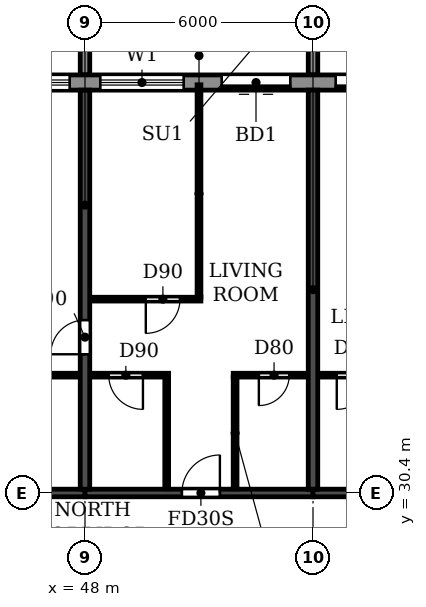
"""IFC4 building model, lengths in metres.
Left out: names, types, materials, properties, quantities, classifications, styles, units other than length and angle.
Written with IfcOpenShell. Run it as: python <this file> out.ifc"""

import sys

from ifc_helpers import new_model, si_unit, direction, frame, frame_2d, origin, place, context, subcontext, project, spatial, polyline, rectangle, outline, extrude, source, transform, mapped, element, fill, save


model = new_model("IFC4")
c1 = context("Model", 3, precision=1e-05, world=origin(), true_north=direction((0.0, 1.0)))
c2 = subcontext(c1, "Body", "Model", "MODEL_VIEW")
j1 = project(units=[si_unit("LENGTHUNIT", "METRE"), si_unit("PLANEANGLEUNIT", "RADIAN")], contexts=[c1])
p1 = place(None, origin())
s1 = spatial("IfcSite", under=j1, at=p1, CompositionType="ELEMENT")
p2 = place(p1, origin())
s2 = spatial("IfcBuilding", under=s1, at=p2, CompositionType="ELEMENT")
p3 = place(p2, frame((0.0, 0.0, 257.7)))
s3 = spatial("IfcBuildingStorey", under=s2, at=p3, CompositionType="ELEMENT", Elevation=257.7)
p4 = place(p3, frame((48.0, 30.5, 0.0), z_axis=(0.0, 0.0, 1.0), x_axis=(0.0, 1.0, 0.0)))
e1 = element("IfcWall", 1, at=p4, inside=s3, PredefinedType="SHEAR", context=c2, shape_type="SweptSolid", body=[
    extrude(rectangle(XDim=10.5, YDim=0.25, at=frame_2d((5.25, 0.0))), origin(), (0.0, 0.0, 1.0), 3.0),
])
p5 = place(p4, frame((3.55, 0.0, 0.0)))
e2 = element("IfcOpeningElement", 2, at=p5, cuts=e1, PredefinedType="OPENING", context=c2, shape_type="SweptSolid", body=[
    extrude(rectangle(XDim=0.9, YDim=2.1, at=frame_2d((0.45, 1.05))), frame((0.0, 0.135, 0.0), z_axis=(0.0, -1.0, 0.0), x_axis=(1.0, 0.0, 0.0)), (0.0, 0.0, 1.0), 0.27),
])
p6 = place(p3, frame((54.0, 30.5, 0.0), z_axis=(0.0, 0.0, 1.0), x_axis=(0.0, 1.0, 0.0)))
e3 = element("IfcWall", 3, at=p6, inside=s3, PredefinedType="SHEAR", context=c2, shape_type="SweptSolid", body=[
    extrude(rectangle(XDim=10.5, YDim=0.25, at=frame_2d((5.25, 0.0))), origin(), (0.0, 0.0, 1.0), 3.0),
])
p7 = place(p3, frame((42.0, 30.4, 0.0), z_axis=(0.0, 0.0, 1.0), x_axis=(1.0, 0.0, 0.0)))
e4 = element("IfcWall", 4, at=p7, inside=s3, PredefinedType="SHEAR", context=c2, shape_type="SweptSolid", body=[
    extrude(rectangle(XDim=6.0, YDim=0.2, at=frame_2d((3.0, 0.0))), origin(), (0.0, 0.0, 1.0), 2.4),
])
p8 = place(p3, frame((48.0, 30.4, 0.0), z_axis=(0.0, 0.0, 1.0), x_axis=(1.0, 0.0, 0.0)))
e5 = element("IfcWall", 5, at=p8, inside=s3, PredefinedType="SHEAR", context=c2, shape_type="SweptSolid", body=[
    extrude(rectangle(XDim=6.0, YDim=0.2, at=frame_2d((3.0, 0.0))), origin(), (0.0, 0.0, 1.0), 2.4),
])
p9 = place(p8, frame((2.55, 0.0, 0.0)))
e6 = element("IfcOpeningElement", 6, at=p9, cuts=e5, PredefinedType="OPENING", context=c2, shape_type="SweptSolid", body=[
    extrude(rectangle(XDim=1.0, YDim=2.1, at=frame_2d((0.5, 1.05))), frame((0.0, 0.11, 0.0), z_axis=(0.0, -1.0, 0.0), x_axis=(1.0, 0.0, 0.0)), (0.0, 0.0, 1.0), 0.22),
])
p10 = place(p3, frame((54.0, 30.4, 0.0), z_axis=(0.0, 0.0, 1.0), x_axis=(1.0, 0.0, 0.0)))
e7 = element("IfcWall", 7, at=p10, inside=s3, PredefinedType="SHEAR", context=c2, shape_type="SweptSolid", body=[
    extrude(rectangle(XDim=6.0, YDim=0.2, at=frame_2d((3.0, 0.0))), origin(), (0.0, 0.0, 1.0), 2.4),
])
p11 = place(p10, frame((2.55, 0.0, 0.0)))
e8 = element("IfcOpeningElement", 8, at=p11, cuts=e7, PredefinedType="OPENING", context=c2, shape_type="SweptSolid", body=[
    extrude(rectangle(XDim=1.0, YDim=2.1, at=frame_2d((0.5, 1.05))), frame((0.0, 0.11, 0.0), z_axis=(0.0, -1.0, 0.0), x_axis=(1.0, 0.0, 0.0)), (0.0, 0.0, 1.0), 0.22),
])
p12 = place(p3, frame((79.317, 41.2, 0.0), z_axis=(0.0, 0.0, 1.0), x_axis=(-1.0, 0.0, 0.0)))
e9 = element("IfcWall", 9, at=p12, inside=s3, PredefinedType="STANDARD", context=c2, shape_type="SweptSolid", body=[
    extrude(rectangle(XDim=56.634, YDim=0.4, at=frame_2d((28.317, 0.0))), origin(), (0.0, 0.0, 1.0), 3.0),
])
p13 = place(p12, frame((52.717, 0.0, 0.9)))
e10 = element("IfcOpeningElement", 10, at=p13, cuts=e9, PredefinedType="OPENING", context=c2, shape_type="SweptSolid", body=[
    extrude(rectangle(XDim=2.2, YDim=1.5, at=frame_2d((1.1, 0.75))), frame((0.0, 0.21, 0.0), z_axis=(0.0, -1.0, 0.0), x_axis=(1.0, 0.0, 0.0)), (0.0, 0.0, 1.0), 0.42),
])
p14 = place(p12, frame((49.717, 0.0, 0.9)))
e11 = element("IfcOpeningElement", 11, at=p14, cuts=e9, PredefinedType="OPENING", context=c2, shape_type="SweptSolid", body=[
    extrude(rectangle(XDim=2.2, YDim=1.5, at=frame_2d((1.1, 0.75))), frame((0.0, 0.21, 0.0), z_axis=(0.0, -1.0, 0.0), x_axis=(1.0, 0.0, 0.0)), (0.0, 0.0, 1.0), 0.42),
])
p15 = place(p12, frame((46.717, 0.0, 0.9)))
e12 = element("IfcOpeningElement", 12, at=p15, cuts=e9, PredefinedType="OPENING", context=c2, shape_type="SweptSolid", body=[
    extrude(rectangle(XDim=2.2, YDim=1.5, at=frame_2d((1.1, 0.75))), frame((0.0, 0.21, 0.0), z_axis=(0.0, -1.0, 0.0), x_axis=(1.0, 0.0, 0.0)), (0.0, 0.0, 1.0), 0.42),
])
p16 = place(p12, frame((43.917, 0.0, 0.0)))
e13 = element("IfcOpeningElement", 13, at=p16, cuts=e9, PredefinedType="OPENING", context=c2, shape_type="SweptSolid", body=[
    extrude(rectangle(XDim=1.8, YDim=2.4, at=frame_2d((0.9, 1.2))), frame((0.0, 0.21, 0.0), z_axis=(0.0, -1.0, 0.0), x_axis=(1.0, 0.0, 0.0)), (0.0, 0.0, 1.0), 0.42),
])
p17 = place(p12, frame((40.717, 0.0, 0.9)))
e14 = element("IfcOpeningElement", 14, at=p17, cuts=e9, PredefinedType="OPENING", context=c2, shape_type="SweptSolid", body=[
    extrude(rectangle(XDim=2.2, YDim=1.5, at=frame_2d((1.1, 0.75))), frame((0.0, 0.21, 0.0), z_axis=(0.0, -1.0, 0.0), x_axis=(1.0, 0.0, 0.0)), (0.0, 0.0, 1.0), 0.42),
])
p18 = place(p12, frame((37.917, 0.0, 0.0)))
e15 = element("IfcOpeningElement", 15, at=p18, cuts=e9, PredefinedType="OPENING", context=c2, shape_type="SweptSolid", body=[
    extrude(rectangle(XDim=1.8, YDim=2.4, at=frame_2d((0.9, 1.2))), frame((0.0, 0.21, 0.0), z_axis=(0.0, -1.0, 0.0), x_axis=(1.0, 0.0, 0.0)), (0.0, 0.0, 1.0), 0.42),
])
p19 = place(p12, frame((34.717, 0.0, 0.9)))
e16 = element("IfcOpeningElement", 16, at=p19, cuts=e9, PredefinedType="OPENING", context=c2, shape_type="SweptSolid", body=[
    extrude(rectangle(XDim=2.2, YDim=1.5, at=frame_2d((1.1, 0.75))), frame((0.0, 0.21, 0.0), z_axis=(0.0, -1.0, 0.0), x_axis=(1.0, 0.0, 0.0)), (0.0, 0.0, 1.0), 0.42),
])
p20 = place(p12, frame((31.717, 0.0, 0.9)))
e17 = element("IfcOpeningElement", 17, at=p20, cuts=e9, PredefinedType="OPENING", context=c2, shape_type="SweptSolid", body=[
    extrude(rectangle(XDim=2.2, YDim=1.5, at=frame_2d((1.1, 0.75))), frame((0.0, 0.21, 0.0), z_axis=(0.0, -1.0, 0.0), x_axis=(1.0, 0.0, 0.0)), (0.0, 0.0, 1.0), 0.42),
])
p21 = place(p12, frame((28.717, 0.0, 0.9)))
e18 = element("IfcOpeningElement", 18, at=p21, cuts=e9, PredefinedType="OPENING", context=c2, shape_type="SweptSolid", body=[
    extrude(rectangle(XDim=2.2, YDim=1.5, at=frame_2d((1.1, 0.75))), frame((0.0, 0.21, 0.0), z_axis=(0.0, -1.0, 0.0), x_axis=(1.0, 0.0, 0.0)), (0.0, 0.0, 1.0), 0.42),
])
p22 = place(p12, frame((25.917, 0.0, 0.0)))
e19 = element("IfcOpeningElement", 19, at=p22, cuts=e9, PredefinedType="OPENING", context=c2, shape_type="SweptSolid", body=[
    extrude(rectangle(XDim=1.8, YDim=2.4, at=frame_2d((0.9, 1.2))), frame((0.0, 0.21, 0.0), z_axis=(0.0, -1.0, 0.0), x_axis=(1.0, 0.0, 0.0)), (0.0, 0.0, 1.0), 0.42),
])
p23 = place(p12, frame((22.917, 0.0, 0.0)))
e20 = element("IfcOpeningElement", 20, at=p23, cuts=e9, PredefinedType="OPENING", context=c2, shape_type="SweptSolid", body=[
    extrude(rectangle(XDim=1.8, YDim=2.4, at=frame_2d((0.9, 1.2))), frame((0.0, 0.21, 0.0), z_axis=(0.0, -1.0, 0.0), x_axis=(1.0, 0.0, 0.0)), (0.0, 0.0, 1.0), 0.42),
])
p24 = place(p12, frame((19.717, 0.0, 0.9)))
e21 = element("IfcOpeningElement", 21, at=p24, cuts=e9, PredefinedType="OPENING", context=c2, shape_type="SweptSolid", body=[
    extrude(rectangle(XDim=2.2, YDim=1.5, at=frame_2d((1.1, 0.75))), frame((0.0, 0.21, 0.0), z_axis=(0.0, -1.0, 0.0), x_axis=(1.0, 0.0, 0.0)), (0.0, 0.0, 1.0), 0.42),
])
p25 = place(p12, frame((16.717, 0.0, 0.9)))
e22 = element("IfcOpeningElement", 22, at=p25, cuts=e9, PredefinedType="OPENING", context=c2, shape_type="SweptSolid", body=[
    extrude(rectangle(XDim=2.2, YDim=1.5, at=frame_2d((1.1, 0.75))), frame((0.0, 0.21, 0.0), z_axis=(0.0, -1.0, 0.0), x_axis=(1.0, 0.0, 0.0)), (0.0, 0.0, 1.0), 0.42),
])
p26 = place(p12, frame((13.717, 0.0, 0.9)))
e23 = element("IfcOpeningElement", 23, at=p26, cuts=e9, PredefinedType="OPENING", context=c2, shape_type="SweptSolid", body=[
    extrude(rectangle(XDim=2.2, YDim=1.5, at=frame_2d((1.1, 0.75))), frame((0.0, 0.21, 0.0), z_axis=(0.0, -1.0, 0.0), x_axis=(1.0, 0.0, 0.0)), (0.0, 0.0, 1.0), 0.42),
])
p27 = place(p12, frame((10.717, 0.0, 0.9)))
e24 = element("IfcOpeningElement", 24, at=p27, cuts=e9, PredefinedType="OPENING", context=c2, shape_type="SweptSolid", body=[
    extrude(rectangle(XDim=2.2, YDim=1.5, at=frame_2d((1.1, 0.75))), frame((0.0, 0.21, 0.0), z_axis=(0.0, -1.0, 0.0), x_axis=(1.0, 0.0, 0.0)), (0.0, 0.0, 1.0), 0.42),
])
p28 = place(p12, frame((7.917, 0.0, 0.0)))
e25 = element("IfcOpeningElement", 25, at=p28, cuts=e9, PredefinedType="OPENING", context=c2, shape_type="SweptSolid", body=[
    extrude(rectangle(XDim=1.8, YDim=2.4, at=frame_2d((0.9, 1.2))), frame((0.0, 0.21, 0.0), z_axis=(0.0, -1.0, 0.0), x_axis=(1.0, 0.0, 0.0)), (0.0, 0.0, 1.0), 0.42),
])
p29 = place(p12, frame((4.717, 0.0, 0.9)))
e26 = element("IfcOpeningElement", 26, at=p29, cuts=e9, PredefinedType="OPENING", context=c2, shape_type="SweptSolid", body=[
    extrude(rectangle(XDim=2.2, YDim=1.5, at=frame_2d((1.1, 0.75))), frame((0.0, 0.21, 0.0), z_axis=(0.0, -1.0, 0.0), x_axis=(1.0, 0.0, 0.0)), (0.0, 0.0, 1.0), 0.42),
])
p30 = place(p12, frame((1.917, 0.0, 0.0)))
e27 = element("IfcOpeningElement", 27, at=p30, cuts=e9, PredefinedType="OPENING", context=c2, shape_type="SweptSolid", body=[
    extrude(rectangle(XDim=1.8, YDim=2.4, at=frame_2d((0.9, 1.2))), frame((0.0, 0.21, 0.0), z_axis=(0.0, -1.0, 0.0), x_axis=(1.0, 0.0, 0.0)), (0.0, 0.0, 1.0), 0.42),
])
m1 = source(origin(), c2, "Body", "SweptSolid", [
    extrude(outline(polyline([(0.0, 0.0), (0.25, 0.0), (0.25, 3.1), (0.0, 3.1), (0.0, 0.0)])), origin(), (0.0, 0.0, 1.0), 3.1),
])
for number, where in (
    (28, (47.875, 41.4, 0.0)),
    (29, (53.875, 41.4, 0.0)),
):
    element("IfcWall", number, at=place(p3, frame(where)), inside=s3, PredefinedType="STANDARD", context=c2, shape_type="MappedRepresentation", body=[
        mapped(m1, transform((0.0, 0.0, 0.0))),
    ])
p31 = place(p3, frame((44.9, 33.5, 0.0), z_axis=(0.0, 0.0, 1.0), x_axis=(1.0, 0.0, 0.0)))
e30 = element("IfcWall", 30, at=p31, inside=s3, PredefinedType="PARTITIONING", context=c2, shape_type="SweptSolid", body=[
    extrude(rectangle(XDim=2.965, YDim=0.1, at=frame_2d((1.482, 0.0))), origin(), (0.0, 0.0, 1.0), 3.0),
])
p32 = place(p31, frame((1.2, 0.0, 0.0)))
e31 = element("IfcOpeningElement", 31, at=p32, cuts=e30, PredefinedType="OPENING", context=c2, shape_type="SweptSolid", body=[
    extrude(rectangle(XDim=0.8, YDim=2.1, at=frame_2d((0.4, 1.05))), frame((0.0, 0.06, 0.0), z_axis=(0.0, -1.0, 0.0), x_axis=(1.0, 0.0, 0.0)), (0.0, 0.0, 1.0), 0.12),
])
p33 = place(p3, frame((48.135, 33.5, 0.0), z_axis=(0.0, 0.0, 1.0), x_axis=(1.0, 0.0, 0.0)))
e32 = element("IfcWall", 32, at=p33, inside=s3, PredefinedType="PARTITIONING", context=c2, shape_type="SweptSolid", body=[
    extrude(rectangle(XDim=2.065, YDim=0.1, at=frame_2d((1.032, 0.0))), origin(), (0.0, 0.0, 1.0), 3.0),
])
p34 = place(p33, frame((0.49, 0.0, 0.0)))
e33 = element("IfcOpeningElement", 33, at=p34, cuts=e32, PredefinedType="OPENING", context=c2, shape_type="SweptSolid", body=[
    extrude(rectangle(XDim=0.9, YDim=2.1, at=frame_2d((0.45, 1.05))), frame((0.0, 0.06, 0.0), z_axis=(0.0, -1.0, 0.0), x_axis=(1.0, 0.0, 0.0)), (0.0, 0.0, 1.0), 0.12),
])
p35 = place(p3, frame((51.9, 33.5, 0.0), z_axis=(0.0, 0.0, 1.0), x_axis=(1.0, 0.0, 0.0)))
e34 = element("IfcWall", 34, at=p35, inside=s3, PredefinedType="PARTITIONING", context=c2, shape_type="SweptSolid", body=[
    extrude(rectangle(XDim=1.965, YDim=0.1, at=frame_2d((0.982, 0.0))), origin(), (0.0, 0.0, 1.0), 3.0),
])
p36 = place(p35, frame((0.675, 0.0, 0.0)))
e35 = element("IfcOpeningElement", 35, at=p36, cuts=e34, PredefinedType="OPENING", context=c2, shape_type="SweptSolid", body=[
    extrude(rectangle(XDim=0.8, YDim=2.1, at=frame_2d((0.4, 1.05))), frame((0.0, 0.06, 0.0), z_axis=(0.0, -1.0, 0.0), x_axis=(1.0, 0.0, 0.0)), (0.0, 0.0, 1.0), 0.12),
])
p37 = place(p3, frame((54.135, 33.5, 0.0), z_axis=(0.0, 0.0, 1.0), x_axis=(1.0, 0.0, 0.0)))
e36 = element("IfcWall", 36, at=p37, inside=s3, PredefinedType="PARTITIONING", context=c2, shape_type="SweptSolid", body=[
    extrude(rectangle(XDim=2.065, YDim=0.1, at=frame_2d((1.032, 0.0))), origin(), (0.0, 0.0, 1.0), 3.0),
])
p38 = place(p37, frame((0.49, 0.0, 0.0)))
e37 = element("IfcOpeningElement", 37, at=p38, cuts=e36, PredefinedType="OPENING", context=c2, shape_type="SweptSolid", body=[
    extrude(rectangle(XDim=0.9, YDim=2.1, at=frame_2d((0.45, 1.05))), frame((0.0, 0.06, 0.0), z_axis=(0.0, -1.0, 0.0), x_axis=(1.0, 0.0, 0.0)), (0.0, 0.0, 1.0), 0.12),
])
p39 = place(p3, frame((48.135, 35.5, 0.0), z_axis=(0.0, 0.0, 1.0), x_axis=(1.0, 0.0, 0.0)))
e38 = element("IfcWall", 38, at=p39, inside=s3, PredefinedType="PARTITIONING", context=c2, shape_type="SweptSolid", body=[
    extrude(rectangle(XDim=2.915, YDim=0.1, at=frame_2d((1.458, 0.0))), origin(), (0.0, 0.0, 1.0), 3.0),
])
p40 = place(p39, frame((1.465, 0.0, 0.0)))
e39 = element("IfcOpeningElement", 39, at=p40, cuts=e38, PredefinedType="OPENING", context=c2, shape_type="SweptSolid", body=[
    extrude(rectangle(XDim=0.9, YDim=2.1, at=frame_2d((0.45, 1.05))), frame((0.0, 0.06, 0.0), z_axis=(0.0, -1.0, 0.0), x_axis=(1.0, 0.0, 0.0)), (0.0, 0.0, 1.0), 0.12),
])
p41 = place(p3, frame((50.15, 30.51, 0.0), z_axis=(0.0, 0.0, 1.0), x_axis=(0.0, 1.0, 0.0)))
e40 = element("IfcWall", 40, at=p41, inside=s3, PredefinedType="PARTITIONING", context=c2, shape_type="SweptSolid", body=[
    extrude(rectangle(XDim=2.94, YDim=0.1, at=frame_2d((1.47, 0.0))), origin(), (0.0, 0.0, 1.0), 3.0),
])
p42 = place(p3, frame((51.0, 35.55, 0.0), z_axis=(0.0, 0.0, 1.0), x_axis=(0.0, 1.0, 0.0)))
e41 = element("IfcWall", 41, at=p42, inside=s3, PredefinedType="PARTITIONING", context=c2, shape_type="SweptSolid", body=[
    extrude(rectangle(XDim=5.59, YDim=0.1, at=frame_2d((2.795, 0.0))), origin(), (0.0, 0.0, 1.0), 3.0),
])
p43 = place(p3, frame((51.95, 30.51, 0.0), z_axis=(0.0, 0.0, 1.0), x_axis=(0.0, 1.0, 0.0)))
e42 = element("IfcWall", 42, at=p43, inside=s3, PredefinedType="PARTITIONING", context=c2, shape_type="SweptSolid", body=[
    extrude(rectangle(XDim=2.94, YDim=0.1, at=frame_2d((1.47, 0.0))), origin(), (0.0, 0.0, 1.0), 3.0),
])
p44 = place(p20, origin())
e43 = element("IfcWindow", 43, at=p44, inside=s3, PartitioningType="DOUBLE_PANEL_HORIZONTAL", PredefinedType="WINDOW", context=c2, shape_type="SweptSolid", body=[
    extrude(rectangle(XDim=2.2, YDim=1.5, at=frame_2d((1.1, 0.75))), frame((0.0, 0.03, 0.0), z_axis=(0.0, -1.0, 0.0), x_axis=(1.0, 0.0, 0.0)), (0.0, 0.0, 1.0), 0.06),
])
fill(e17, e43)
p45 = place(p21, origin())
e44 = element("IfcWindow", 44, at=p45, inside=s3, PartitioningType="DOUBLE_PANEL_HORIZONTAL", PredefinedType="WINDOW", context=c2, shape_type="SweptSolid", body=[
    extrude(rectangle(XDim=2.2, YDim=1.5, at=frame_2d((1.1, 0.75))), frame((0.0, 0.03, 0.0), z_axis=(0.0, -1.0, 0.0), x_axis=(1.0, 0.0, 0.0)), (0.0, 0.0, 1.0), 0.06),
])
fill(e18, e44)
p46 = place(p22, origin())
e45 = element("IfcDoor", 45, at=p46, inside=s3, OperationType="DOUBLE_DOOR_SLIDING", PredefinedType="DOOR", context=c2, shape_type="SweptSolid", body=[
    extrude(rectangle(XDim=1.8, YDim=2.4, at=frame_2d((0.9, 1.2))), frame((0.0, 0.025, 0.0), z_axis=(0.0, -1.0, 0.0), x_axis=(1.0, 0.0, 0.0)), (0.0, 0.0, 1.0), 0.05),
])
fill(e19, e45)
p47 = place(p23, origin())
e46 = element("IfcDoor", 46, at=p47, inside=s3, OperationType="DOUBLE_DOOR_SLIDING", PredefinedType="DOOR", context=c2, shape_type="SweptSolid", body=[
    extrude(rectangle(XDim=1.8, YDim=2.4, at=frame_2d((0.9, 1.2))), frame((0.0, 0.025, 0.0), z_axis=(0.0, -1.0, 0.0), x_axis=(1.0, 0.0, 0.0)), (0.0, 0.0, 1.0), 0.05),
])
fill(e20, e46)
p48 = place(p5, origin())
e47 = element("IfcDoor", 47, at=p48, inside=s3, OperationType="SINGLE_SWING_LEFT", PredefinedType="DOOR", context=c2, shape_type="SweptSolid", body=[
    extrude(rectangle(XDim=0.9, YDim=2.1, at=frame_2d((0.45, 1.05))), frame((0.0, 0.025, 0.0), z_axis=(0.0, -1.0, 0.0), x_axis=(1.0, 0.0, 0.0)), (0.0, 0.0, 1.0), 0.05),
])
fill(e2, e47)
p49 = place(p34, frame((0.9, 0.0, 0.0), z_axis=(0.0, 0.0, 1.0), x_axis=(-1.0, 0.0, 0.0)))
e48 = element("IfcDoor", 48, at=p49, inside=s3, OperationType="SINGLE_SWING_LEFT", PredefinedType="DOOR", context=c2, shape_type="SweptSolid", body=[
    extrude(rectangle(XDim=0.9, YDim=2.1, at=frame_2d((0.45, 1.05))), frame((0.0, 0.025, 0.0), z_axis=(0.0, -1.0, 0.0), x_axis=(1.0, 0.0, 0.0)), (0.0, 0.0, 1.0), 0.05),
])
fill(e33, e48)
p50 = place(p40, frame((0.9, 0.0, 0.0), z_axis=(0.0, 0.0, 1.0), x_axis=(-1.0, 0.0, 0.0)))
e49 = element("IfcDoor", 49, at=p50, inside=s3, OperationType="SINGLE_SWING_RIGHT", PredefinedType="DOOR", context=c2, shape_type="SweptSolid", body=[
    extrude(rectangle(XDim=0.9, YDim=2.1, at=frame_2d((0.45, 1.05))), frame((0.0, 0.025, 0.0), z_axis=(0.0, -1.0, 0.0), x_axis=(1.0, 0.0, 0.0)), (0.0, 0.0, 1.0), 0.05),
])
fill(e39, e49)
p51 = place(p9, origin())
e50 = element("IfcDoor", 50, at=p51, inside=s3, OperationType="SINGLE_SWING_RIGHT", PredefinedType="DOOR", context=c2, shape_type="SweptSolid", body=[
    extrude(rectangle(XDim=1.0, YDim=2.1, at=frame_2d((0.5, 1.05))), frame((0.0, 0.025, 0.0), z_axis=(0.0, -1.0, 0.0), x_axis=(1.0, 0.0, 0.0)), (0.0, 0.0, 1.0), 0.05),
])
fill(e6, e50)
p52 = place(p36, frame((0.8, 0.0, 0.0), z_axis=(0.0, 0.0, 1.0), x_axis=(-1.0, 0.0, 0.0)))
e51 = element("IfcDoor", 51, at=p52, inside=s3, OperationType="SINGLE_SWING_RIGHT", PredefinedType="DOOR", context=c2, shape_type="SweptSolid", body=[
    extrude(rectangle(XDim=0.8, YDim=2.1, at=frame_2d((0.4, 1.05))), frame((0.0, 0.025, 0.0), z_axis=(0.0, -1.0, 0.0), x_axis=(1.0, 0.0, 0.0)), (0.0, 0.0, 1.0), 0.05),
])
fill(e35, e51)
p53 = place(p38, frame((0.9, 0.0, 0.0), z_axis=(0.0, 0.0, 1.0), x_axis=(-1.0, 0.0, 0.0)))
e52 = element("IfcDoor", 52, at=p53, inside=s3, OperationType="SINGLE_SWING_RIGHT", PredefinedType="DOOR", context=c2, shape_type="SweptSolid", body=[
    extrude(rectangle(XDim=0.9, YDim=2.1, at=frame_2d((0.45, 1.05))), frame((0.0, 0.025, 0.0), z_axis=(0.0, -1.0, 0.0), x_axis=(1.0, 0.0, 0.0)), (0.0, 0.0, 1.0), 0.05),
])
fill(e37, e52)
save(model, sys.argv[1])
